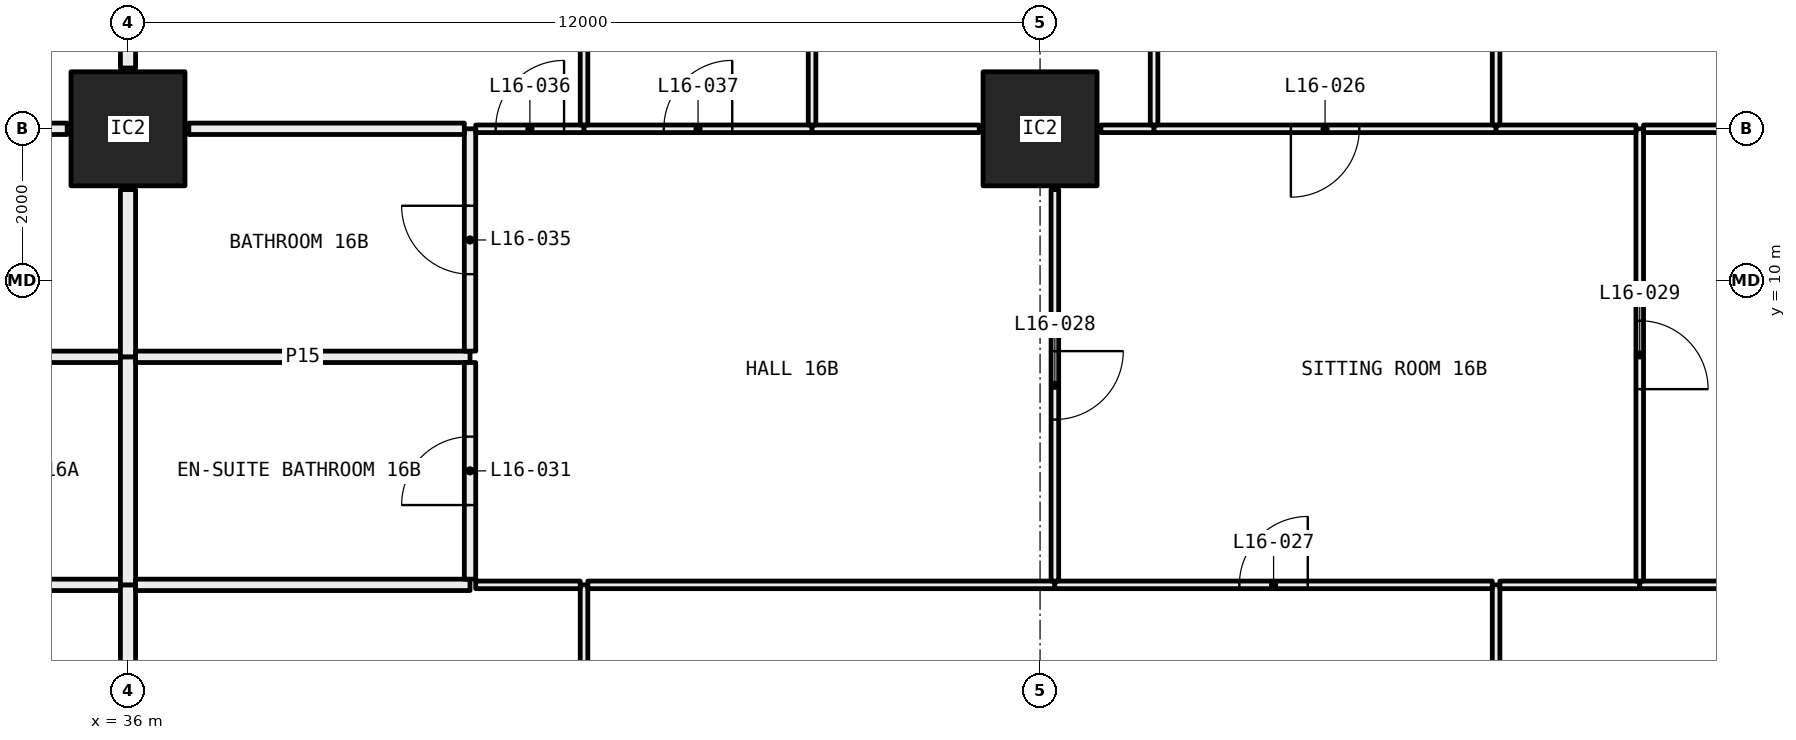
"""IFC4 building model, lengths in metres.
Left out: names, types, materials, properties, quantities, classifications, styles, units other than length and angle.
Written with IfcOpenShell. Run it as: python <this file> out.ifc"""

import sys

from ifc_helpers import new_model, si_unit, direction, frame, frame_2d, origin, origin_2d, place, context, subcontext, project, spatial, rectangle, hollow_rectangle, extrude, element, fill, save


model = new_model("IFC4")
c1 = context("Model", 3, precision=1e-05, world=origin(), true_north=direction((0.0, 1.0)))
c2 = subcontext(c1, "Body", "Model", "MODEL_VIEW")
j1 = project(units=[si_unit("LENGTHUNIT", "METRE"), si_unit("PLANEANGLEUNIT", "RADIAN")], contexts=[c1])
p1 = place(None, origin())
s1 = spatial("IfcSite", under=j1, at=p1, CompositionType="ELEMENT")
p2 = place(p1, origin())
s2 = spatial("IfcBuilding", under=s1, at=p2, CompositionType="ELEMENT")
p3 = place(p2, frame((0.0, 0.0, 67.95)))
s3 = spatial("IfcBuildingStorey", under=s2, at=p3, CompositionType="ELEMENT", Elevation=67.95)
for number, where, z_axis, x_axis in (
    (1, (36.0, 12.0, 0.0), (0.0, 0.0, 1.0), (1.0, 0.0, 0.0)),
    (2, (48.0, 12.0, 0.0), (0.0, 0.0, 1.0), (1.0, 0.0, 0.0)),
):
    element("IfcColumn", number, at=place(p3, frame(where, z_axis=z_axis, x_axis=x_axis)), inside=s3, PredefinedType="COLUMN", context=c2, shape_type="SweptSolid", body=[
        extrude(hollow_rectangle(XDim=1.5, YDim=1.5, WallThickness=0.065, at=origin_2d()), origin(), (0.0, 0.0, 1.0), 3.05),
    ])
p4 = place(p3, frame((35.9, 6.0, 0.0), z_axis=(0.0, 0.0, 1.0), x_axis=(-1.0, 0.0, 0.0)))
e3 = element("IfcWall", 3, at=p4, inside=s3, PredefinedType="PARTITIONING", context=c2, shape_type="SweptSolid", body=[
    extrude(rectangle(XDim=4.4, YDim=0.15, at=frame_2d((2.2, 0.0))), origin(), (0.0, 0.0, 1.0), 3.05),
])
p5 = place(p3, frame((36.0, 0.72, 0.0), z_axis=(0.0, 0.0, 1.0), x_axis=(0.0, 1.0, 0.0)))
e4 = element("IfcWall", 4, at=p5, inside=s3, PredefinedType="PARTITIONING", context=c2, shape_type="SweptSolid", body=[
    extrude(rectangle(XDim=5.28, YDim=0.2, at=frame_2d((2.64, 0.0))), origin(), (0.0, 0.0, 1.0), 2.45),
])
p6 = place(p3, frame((35.9, 9.0, 0.0), z_axis=(0.0, 0.0, 1.0), x_axis=(-1.0, 0.0, 0.0)))
e5 = element("IfcWall", 5, at=p6, inside=s3, PredefinedType="PARTITIONING", context=c2, shape_type="SweptSolid", body=[
    extrude(rectangle(XDim=4.325, YDim=0.15, at=frame_2d((2.163, 0.0))), origin(), (0.0, 0.0, 1.0), 3.05),
])
p7 = place(p3, frame((36.0, 6.0, 0.0), z_axis=(0.0, 0.0, 1.0), x_axis=(0.0, 1.0, 0.0)))
e6 = element("IfcWall", 6, at=p7, inside=s3, PredefinedType="PARTITIONING", context=c2, shape_type="SweptSolid", body=[
    extrude(rectangle(XDim=3.0, YDim=0.2, at=frame_2d((1.5, 0.0))), origin(), (0.0, 0.0, 1.0), 2.45),
])
p8 = place(p3, frame((35.2, 12.0, 0.0), z_axis=(0.0, 0.0, 1.0), x_axis=(-1.0, 0.0, 0.0)))
e7 = element("IfcWall", 7, at=p8, inside=s3, PredefinedType="PARTITIONING", context=c2, shape_type="SweptSolid", body=[
    extrude(rectangle(XDim=3.625, YDim=0.15, at=frame_2d((1.812, 0.0))), origin(), (0.0, 0.0, 1.0), 2.45),
])
p9 = place(p3, frame((36.0, 9.0, 0.0), z_axis=(0.0, 0.0, 1.0), x_axis=(0.0, 1.0, 0.0)))
e8 = element("IfcWall", 8, at=p9, inside=s3, PredefinedType="PARTITIONING", context=c2, shape_type="SweptSolid", body=[
    extrude(rectangle(XDim=2.2, YDim=0.2, at=frame_2d((1.1, 0.0))), origin(), (0.0, 0.0, 1.0), 2.45),
])
p10 = place(p3, frame((36.0, 12.8, 0.0), z_axis=(0.0, 0.0, 1.0), x_axis=(0.0, 1.0, 0.0)))
e9 = element("IfcWall", 9, at=p10, inside=s3, PredefinedType="PARTITIONING", context=c2, shape_type="SweptSolid", body=[
    extrude(rectangle(XDim=5.2, YDim=0.2, at=frame_2d((2.6, 0.0))), origin(), (0.0, 0.0, 1.0), 2.45),
])
p11 = place(p3, frame((42.0, 0.72, 0.0), z_axis=(0.0, 0.0, 1.0), x_axis=(0.0, 1.0, 0.0)))
e10 = element("IfcWall", 10, at=p11, inside=s3, PredefinedType="PARTITIONING", context=c2, shape_type="SweptSolid", body=[
    extrude(rectangle(XDim=5.28, YDim=0.1, at=frame_2d((2.64, 0.0))), origin(), (0.0, 0.0, 1.0), 3.05),
])
p12 = place(p11, frame((2.19, 0.0, 0.0)))
e11 = element("IfcOpeningElement", 11, at=p12, cuts=e10, PredefinedType="OPENING", context=c2, shape_type="SweptSolid", body=[
    extrude(rectangle(XDim=0.9, YDim=2.1, at=frame_2d((0.45, 1.05))), frame((0.0, 0.06, 0.0), z_axis=(0.0, -1.0, 0.0), x_axis=(1.0, 0.0, 0.0)), (0.0, 0.0, 1.0), 0.12),
])
p13 = place(p3, frame((40.5, 6.0, 0.0), z_axis=(0.0, 0.0, 1.0), x_axis=(-1.0, 0.0, 0.0)))
e12 = element("IfcWall", 12, at=p13, inside=s3, PredefinedType="PARTITIONING", context=c2, shape_type="SweptSolid", body=[
    extrude(rectangle(XDim=4.4, YDim=0.15, at=frame_2d((2.2, 0.0))), origin(), (0.0, 0.0, 1.0), 3.05),
])
p14 = place(p3, frame((41.95, 6.0, 0.0), z_axis=(0.0, 0.0, 1.0), x_axis=(-1.0, 0.0, 0.0)))
e13 = element("IfcWall", 13, at=p14, inside=s3, PredefinedType="PARTITIONING", context=c2, shape_type="SweptSolid", body=[
    extrude(rectangle(XDim=1.375, YDim=0.1, at=frame_2d((0.688, 0.0))), origin(), (0.0, 0.0, 1.0), 3.05),
])
p15 = place(p3, frame((54.0, 0.72, 0.0), z_axis=(0.0, 0.0, 1.0), x_axis=(0.0, 1.0, 0.0)))
e14 = element("IfcWall", 14, at=p15, inside=s3, PredefinedType="PARTITIONING", context=c2, shape_type="SweptSolid", body=[
    extrude(rectangle(XDim=5.28, YDim=0.1, at=frame_2d((2.64, 0.0))), origin(), (0.0, 0.0, 1.0), 3.05),
])
p16 = place(p15, frame((2.19, 0.0, 0.0)))
e15 = element("IfcOpeningElement", 15, at=p16, cuts=e14, PredefinedType="OPENING", context=c2, shape_type="SweptSolid", body=[
    extrude(rectangle(XDim=0.9, YDim=2.1, at=frame_2d((0.45, 1.05))), frame((0.0, 0.06, 0.0), z_axis=(0.0, -1.0, 0.0), x_axis=(1.0, 0.0, 0.0)), (0.0, 0.0, 1.0), 0.12),
])
p17 = place(p3, frame((48.195, 6.0, 0.0), z_axis=(0.0, 0.0, 1.0), x_axis=(-1.0, 0.0, 0.0)))
e16 = element("IfcWall", 16, at=p17, inside=s3, PredefinedType="PARTITIONING", context=c2, shape_type="SweptSolid", body=[
    extrude(rectangle(XDim=6.145, YDim=0.1, at=frame_2d((3.073, 0.0))), origin(), (0.0, 0.0, 1.0), 2.45),
])
p18 = place(p3, frame((53.95, 6.0, 0.0), z_axis=(0.0, 0.0, 1.0), x_axis=(-1.0, 0.0, 0.0)))
e17 = element("IfcWall", 17, at=p18, inside=s3, PredefinedType="PARTITIONING", context=c2, shape_type="SweptSolid", body=[
    extrude(rectangle(XDim=5.755, YDim=0.1, at=frame_2d((2.877, 0.0))), origin(), (0.0, 0.0, 1.0), 3.05),
])
p19 = place(p18, frame((2.427, 0.0, 0.0)))
e18 = element("IfcOpeningElement", 18, at=p19, cuts=e17, PredefinedType="OPENING", context=c2, shape_type="SweptSolid", body=[
    extrude(rectangle(XDim=0.9, YDim=2.1, at=frame_2d((0.45, 1.05))), frame((0.0, 0.06, 0.0), z_axis=(0.0, -1.0, 0.0), x_axis=(1.0, 0.0, 0.0)), (0.0, 0.0, 1.0), 0.12),
])
p20 = place(p3, frame((55.89, 6.0, 0.0), z_axis=(0.0, 0.0, 1.0), x_axis=(-1.0, 0.0, 0.0)))
e19 = element("IfcWall", 19, at=p20, inside=s3, PredefinedType="PARTITIONING", context=c2, shape_type="SweptSolid", body=[
    extrude(rectangle(XDim=1.84, YDim=0.1, at=frame_2d((0.92, 0.0))), origin(), (0.0, 0.0, 1.0), 3.05),
])
p21 = place(p3, frame((59.95, 6.0, 0.0), z_axis=(0.0, 0.0, 1.0), x_axis=(-1.0, 0.0, 0.0)))
e20 = element("IfcWall", 20, at=p21, inside=s3, PredefinedType="PARTITIONING", context=c2, shape_type="SweptSolid", body=[
    extrude(rectangle(XDim=4.06, YDim=0.1, at=frame_2d((2.03, 0.0))), origin(), (0.0, 0.0, 1.0), 2.45),
])
p22 = place(p3, frame((40.5, 9.0, 0.0), z_axis=(0.0, 0.0, 1.0), x_axis=(-1.0, 0.0, 0.0)))
e21 = element("IfcWall", 21, at=p22, inside=s3, PredefinedType="PARTITIONING", context=c2, shape_type="SweptSolid", body=[
    extrude(rectangle(XDim=4.4, YDim=0.15, at=frame_2d((2.2, 0.0))), origin(), (0.0, 0.0, 1.0), 3.05),
])
p23 = place(p3, frame((40.5, 6.075, 0.0), z_axis=(0.0, 0.0, 1.0), x_axis=(0.0, 1.0, 0.0)))
e22 = element("IfcWall", 22, at=p23, inside=s3, PredefinedType="PARTITIONING", context=c2, shape_type="SweptSolid", body=[
    extrude(rectangle(XDim=2.85, YDim=0.15, at=frame_2d((1.425, 0.0))), origin(), (0.0, 0.0, 1.0), 3.05),
])
p24 = place(p23, frame((0.975, 0.0, 0.0)))
e23 = element("IfcOpeningElement", 23, at=p24, cuts=e22, PredefinedType="OPENING", context=c2, shape_type="SweptSolid", body=[
    extrude(rectangle(XDim=0.9, YDim=2.1, at=frame_2d((0.45, 1.05))), frame((0.0, 0.085, 0.0), z_axis=(0.0, -1.0, 0.0), x_axis=(1.0, 0.0, 0.0)), (0.0, 0.0, 1.0), 0.17),
])
p25 = place(p3, frame((40.5, 9.075, 0.0), z_axis=(0.0, 0.0, 1.0), x_axis=(0.0, 1.0, 0.0)))
e24 = element("IfcWall", 24, at=p25, inside=s3, PredefinedType="PARTITIONING", context=c2, shape_type="SweptSolid", body=[
    extrude(rectangle(XDim=2.925, YDim=0.15, at=frame_2d((1.462, 0.0))), origin(), (0.0, 0.0, 1.0), 2.45),
])
p26 = place(p25, frame((1.012, 0.0, 0.0)))
e25 = element("IfcOpeningElement", 25, at=p26, cuts=e24, PredefinedType="OPENING", context=c2, shape_type="SweptSolid", body=[
    extrude(rectangle(XDim=0.9, YDim=2.1, at=frame_2d((0.45, 1.05))), frame((0.0, 0.085, 0.0), z_axis=(0.0, -1.0, 0.0), x_axis=(1.0, 0.0, 0.0)), (0.0, 0.0, 1.0), 0.17),
])
p27 = place(p3, frame((40.425, 12.0, 0.0), z_axis=(0.0, 0.0, 1.0), x_axis=(-1.0, 0.0, 0.0)))
e26 = element("IfcWall", 26, at=p27, inside=s3, PredefinedType="PARTITIONING", context=c2, shape_type="SweptSolid", body=[
    extrude(rectangle(XDim=3.625, YDim=0.15, at=frame_2d((1.812, 0.0))), origin(), (0.0, 0.0, 1.0), 2.45),
])
p28 = place(p3, frame((48.195, 6.05, 0.0), z_axis=(0.0, 0.0, 1.0), x_axis=(0.0, 1.0, 0.0)))
e27 = element("IfcWall", 27, at=p28, inside=s3, PredefinedType="PARTITIONING", context=c2, shape_type="SweptSolid", body=[
    extrude(rectangle(XDim=5.15, YDim=0.1, at=frame_2d((2.575, 0.0))), origin(), (0.0, 0.0, 1.0), 3.05),
])
p29 = place(p28, frame((2.125, 0.0, 0.0)))
e28 = element("IfcOpeningElement", 28, at=p29, cuts=e27, PredefinedType="OPENING", context=c2, shape_type="SweptSolid", body=[
    extrude(rectangle(XDim=0.9, YDim=2.1, at=frame_2d((0.45, 1.05))), frame((0.0, 0.06, 0.0), z_axis=(0.0, -1.0, 0.0), x_axis=(1.0, 0.0, 0.0)), (0.0, 0.0, 1.0), 0.12),
])
p30 = place(p3, frame((42.0, 12.0, 0.0), z_axis=(0.0, 0.0, 1.0), x_axis=(-1.0, 0.0, 0.0)))
e29 = element("IfcWall", 29, at=p30, inside=s3, PredefinedType="PARTITIONING", context=c2, shape_type="SweptSolid", body=[
    extrude(rectangle(XDim=1.425, YDim=0.1, at=frame_2d((0.712, 0.0))), origin(), (0.0, 0.0, 1.0), 2.45),
])
p31 = place(p30, frame((0.262, 0.0, 0.0)))
e30 = element("IfcOpeningElement", 30, at=p31, cuts=e29, PredefinedType="OPENING", context=c2, shape_type="SweptSolid", body=[
    extrude(rectangle(XDim=0.9, YDim=2.1, at=frame_2d((0.45, 1.05))), frame((0.0, 0.06, 0.0), z_axis=(0.0, -1.0, 0.0), x_axis=(1.0, 0.0, 0.0)), (0.0, 0.0, 1.0), 0.12),
])
p32 = place(p3, frame((45.0, 12.0, 0.0), z_axis=(0.0, 0.0, 1.0), x_axis=(-1.0, 0.0, 0.0)))
e31 = element("IfcWall", 31, at=p32, inside=s3, PredefinedType="PARTITIONING", context=c2, shape_type="SweptSolid", body=[
    extrude(rectangle(XDim=3.0, YDim=0.1, at=frame_2d((1.5, 0.0))), origin(), (0.0, 0.0, 1.0), 2.45),
])
p33 = place(p32, frame((1.05, 0.0, 0.0)))
e32 = element("IfcOpeningElement", 32, at=p33, cuts=e31, PredefinedType="OPENING", context=c2, shape_type="SweptSolid", body=[
    extrude(rectangle(XDim=0.9, YDim=2.1, at=frame_2d((0.45, 1.05))), frame((0.0, 0.06, 0.0), z_axis=(0.0, -1.0, 0.0), x_axis=(1.0, 0.0, 0.0)), (0.0, 0.0, 1.0), 0.12),
])
p34 = place(p3, frame((47.2, 12.0, 0.0), z_axis=(0.0, 0.0, 1.0), x_axis=(-1.0, 0.0, 0.0)))
e33 = element("IfcWall", 33, at=p34, inside=s3, PredefinedType="PARTITIONING", context=c2, shape_type="SweptSolid", body=[
    extrude(rectangle(XDim=2.2, YDim=0.1, at=frame_2d((1.1, 0.0))), origin(), (0.0, 0.0, 1.0), 2.45),
])
p35 = place(p3, frame((55.89, 6.05, 0.0), z_axis=(0.0, 0.0, 1.0), x_axis=(0.0, 1.0, 0.0)))
e34 = element("IfcWall", 34, at=p35, inside=s3, PredefinedType="PARTITIONING", context=c2, shape_type="SweptSolid", body=[
    extrude(rectangle(XDim=5.95, YDim=0.1, at=frame_2d((2.975, 0.0))), origin(), (0.0, 0.0, 1.0), 2.45),
])
p36 = place(p35, frame((2.525, 0.0, 0.0)))
e35 = element("IfcOpeningElement", 35, at=p36, cuts=e34, PredefinedType="OPENING", context=c2, shape_type="SweptSolid", body=[
    extrude(rectangle(XDim=0.9, YDim=2.1, at=frame_2d((0.45, 1.05))), frame((0.0, 0.06, 0.0), z_axis=(0.0, -1.0, 0.0), x_axis=(1.0, 0.0, 0.0)), (0.0, 0.0, 1.0), 0.12),
])
p37 = place(p3, frame((49.5, 12.0, 0.0), z_axis=(0.0, 0.0, 1.0), x_axis=(-1.0, 0.0, 0.0)))
e36 = element("IfcWall", 36, at=p37, inside=s3, PredefinedType="PARTITIONING", context=c2, shape_type="SweptSolid", body=[
    extrude(rectangle(XDim=0.7, YDim=0.1, at=frame_2d((0.35, 0.0))), origin(), (0.0, 0.0, 1.0), 2.45),
])
p38 = place(p3, frame((54.0, 12.0, 0.0), z_axis=(0.0, 0.0, 1.0), x_axis=(-1.0, 0.0, 0.0)))
e37 = element("IfcWall", 37, at=p38, inside=s3, PredefinedType="PARTITIONING", context=c2, shape_type="SweptSolid", body=[
    extrude(rectangle(XDim=4.5, YDim=0.1, at=frame_2d((2.25, 0.0))), origin(), (0.0, 0.0, 1.0), 2.45),
])
p39 = place(p38, frame((1.8, 0.0, 0.0)))
e38 = element("IfcOpeningElement", 38, at=p39, cuts=e37, PredefinedType="OPENING", context=c2, shape_type="SweptSolid", body=[
    extrude(rectangle(XDim=0.9, YDim=2.1, at=frame_2d((0.45, 1.05))), frame((0.0, 0.06, 0.0), z_axis=(0.0, -1.0, 0.0), x_axis=(1.0, 0.0, 0.0)), (0.0, 0.0, 1.0), 0.12),
])
p40 = place(p3, frame((55.84, 12.0, 0.0), z_axis=(0.0, 0.0, 1.0), x_axis=(-1.0, 0.0, 0.0)))
e39 = element("IfcWall", 39, at=p40, inside=s3, PredefinedType="PARTITIONING", context=c2, shape_type="SweptSolid", body=[
    extrude(rectangle(XDim=1.84, YDim=0.1, at=frame_2d((0.92, 0.0))), origin(), (0.0, 0.0, 1.0), 2.45),
])
p41 = place(p3, frame((59.2, 12.0, 0.0), z_axis=(0.0, 0.0, 1.0), x_axis=(-1.0, 0.0, 0.0)))
e40 = element("IfcWall", 40, at=p41, inside=s3, PredefinedType="PARTITIONING", context=c2, shape_type="SweptSolid", body=[
    extrude(rectangle(XDim=3.26, YDim=0.1, at=frame_2d((1.63, 0.0))), origin(), (0.0, 0.0, 1.0), 2.45),
])
for number, where, z_axis, x_axis in (
    (41, (42.0, 12.05, 0.0), (0.0, 0.0, 1.0), (0.0, 1.0, 0.0)),
    (42, (45.0, 12.05, 0.0), (0.0, 0.0, 1.0), (0.0, 1.0, 0.0)),
):
    element("IfcWall", number, at=place(p3, frame(where, z_axis=z_axis, x_axis=x_axis)), inside=s3, PredefinedType="PARTITIONING", context=c2, shape_type="SweptSolid", body=[
        extrude(rectangle(XDim=5.95, YDim=0.1, at=frame_2d((2.975, 0.0))), origin(), (0.0, 0.0, 1.0), 2.45),
    ])
p42 = place(p3, frame((49.5, 12.05, 0.0), z_axis=(0.0, 0.0, 1.0), x_axis=(0.0, 1.0, 0.0)))
e43 = element("IfcWall", 43, at=p42, inside=s3, PredefinedType="PARTITIONING", context=c2, shape_type="SweptSolid", body=[
    extrude(rectangle(XDim=5.85, YDim=0.1, at=frame_2d((2.925, 0.0))), origin(), (0.0, 0.0, 1.0), 2.45),
])
p43 = place(p42, frame((2.475, 0.0, 0.0)))
e44 = element("IfcOpeningElement", 44, at=p43, cuts=e43, PredefinedType="OPENING", context=c2, shape_type="SweptSolid", body=[
    extrude(rectangle(XDim=0.9, YDim=2.1, at=frame_2d((0.45, 1.05))), frame((0.0, 0.06, 0.0), z_axis=(0.0, -1.0, 0.0), x_axis=(1.0, 0.0, 0.0)), (0.0, 0.0, 1.0), 0.12),
])
p44 = place(p3, frame((54.0, 12.05, 0.0), z_axis=(0.0, 0.0, 1.0), x_axis=(0.0, 1.0, 0.0)))
e45 = element("IfcWall", 45, at=p44, inside=s3, PredefinedType="PARTITIONING", context=c2, shape_type="SweptSolid", body=[
    extrude(rectangle(XDim=5.85, YDim=0.1, at=frame_2d((2.925, 0.0))), origin(), (0.0, 0.0, 1.0), 2.45),
])
p45 = place(p44, frame((2.475, 0.0, 0.0)))
e46 = element("IfcOpeningElement", 46, at=p45, cuts=e45, PredefinedType="OPENING", context=c2, shape_type="SweptSolid", body=[
    extrude(rectangle(XDim=0.9, YDim=2.1, at=frame_2d((0.45, 1.05))), frame((0.0, 0.06, 0.0), z_axis=(0.0, -1.0, 0.0), x_axis=(1.0, 0.0, 0.0)), (0.0, 0.0, 1.0), 0.12),
])
p46 = place(p39, origin())
e47 = element("IfcDoor", 47, at=p46, inside=s3, OperationType="SINGLE_SWING_LEFT", PredefinedType="DOOR", context=c2, shape_type="SweptSolid", body=[
    extrude(rectangle(XDim=0.9, YDim=2.1, at=frame_2d((0.45, 1.05))), frame((0.0, 0.025, 0.0), z_axis=(0.0, -1.0, 0.0), x_axis=(1.0, 0.0, 0.0)), (0.0, 0.0, 1.0), 0.05),
])
fill(e38, e47)
p47 = place(p19, frame((0.9, 0.0, 0.0), x_axis=(-1.0, 0.0, 0.0)))
e48 = element("IfcDoor", 48, at=p47, inside=s3, OperationType="SINGLE_SWING_LEFT", PredefinedType="DOOR", context=c2, shape_type="SweptSolid", body=[
    extrude(rectangle(XDim=0.9, YDim=2.1, at=frame_2d((0.45, 1.05))), frame((0.0, 0.025, 0.0), z_axis=(0.0, -1.0, 0.0), x_axis=(1.0, 0.0, 0.0)), (0.0, 0.0, 1.0), 0.05),
])
fill(e18, e48)
p48 = place(p29, frame((0.9, 0.0, 0.0), x_axis=(-1.0, 0.0, 0.0)))
e49 = element("IfcDoor", 49, at=p48, inside=s3, OperationType="SINGLE_SWING_RIGHT", PredefinedType="DOOR", context=c2, shape_type="SweptSolid", body=[
    extrude(rectangle(XDim=0.9, YDim=2.1, at=frame_2d((0.45, 1.05))), frame((0.0, 0.025, 0.0), z_axis=(0.0, -1.0, 0.0), x_axis=(1.0, 0.0, 0.0)), (0.0, 0.0, 1.0), 0.05),
])
fill(e28, e49)
p49 = place(p36, frame((0.9, 0.0, 0.0), x_axis=(-1.0, 0.0, 0.0)))
e50 = element("IfcDoor", 50, at=p49, inside=s3, OperationType="SINGLE_SWING_LEFT", PredefinedType="DOOR", context=c2, shape_type="SweptSolid", body=[
    extrude(rectangle(XDim=0.9, YDim=2.1, at=frame_2d((0.45, 1.05))), frame((0.0, 0.025, 0.0), z_axis=(0.0, -1.0, 0.0), x_axis=(1.0, 0.0, 0.0)), (0.0, 0.0, 1.0), 0.05),
])
fill(e35, e50)
p50 = place(p24, origin())
e51 = element("IfcDoor", 51, at=p50, inside=s3, OperationType="SINGLE_SWING_RIGHT", PredefinedType="DOOR", context=c2, shape_type="SweptSolid", body=[
    extrude(rectangle(XDim=0.9, YDim=2.1, at=frame_2d((0.45, 1.05))), frame((0.0, 0.025, 0.0), z_axis=(0.0, -1.0, 0.0), x_axis=(1.0, 0.0, 0.0)), (0.0, 0.0, 1.0), 0.05),
])
fill(e23, e51)
p51 = place(p26, origin())
e52 = element("IfcDoor", 52, at=p51, inside=s3, OperationType="SINGLE_SWING_LEFT", PredefinedType="DOOR", context=c2, shape_type="SweptSolid", body=[
    extrude(rectangle(XDim=0.9, YDim=2.1, at=frame_2d((0.45, 1.05))), frame((0.0, 0.025, 0.0), z_axis=(0.0, -1.0, 0.0), x_axis=(1.0, 0.0, 0.0)), (0.0, 0.0, 1.0), 0.05),
])
fill(e25, e52)
p52 = place(p31, frame((0.9, 0.0, 0.0), x_axis=(-1.0, 0.0, 0.0)))
e53 = element("IfcDoor", 53, at=p52, inside=s3, OperationType="SINGLE_SWING_LEFT", PredefinedType="DOOR", context=c2, shape_type="SweptSolid", body=[
    extrude(rectangle(XDim=0.9, YDim=2.1, at=frame_2d((0.45, 1.05))), frame((0.0, 0.025, 0.0), z_axis=(0.0, -1.0, 0.0), x_axis=(1.0, 0.0, 0.0)), (0.0, 0.0, 1.0), 0.05),
])
fill(e30, e53)
p53 = place(p33, frame((0.9, 0.0, 0.0), x_axis=(-1.0, 0.0, 0.0)))
e54 = element("IfcDoor", 54, at=p53, inside=s3, OperationType="SINGLE_SWING_LEFT", PredefinedType="DOOR", context=c2, shape_type="SweptSolid", body=[
    extrude(rectangle(XDim=0.9, YDim=2.1, at=frame_2d((0.45, 1.05))), frame((0.0, 0.025, 0.0), z_axis=(0.0, -1.0, 0.0), x_axis=(1.0, 0.0, 0.0)), (0.0, 0.0, 1.0), 0.05),
])
fill(e32, e54)
save(model, sys.argv[1])
